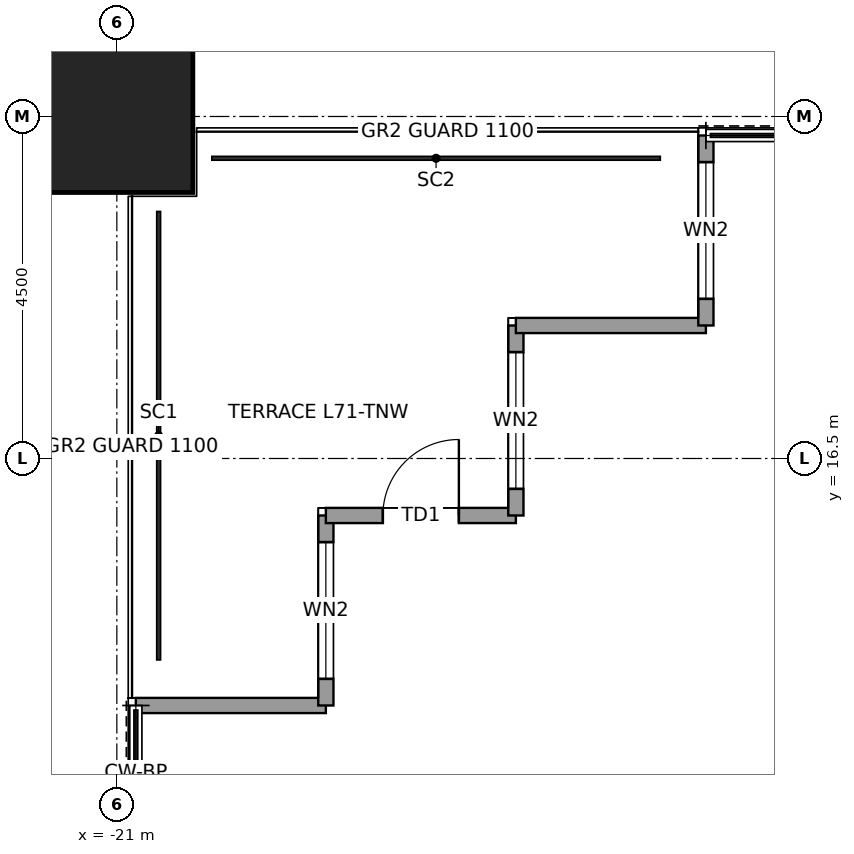
"""IFC4 building model, lengths in metres.
Left out: names, types, materials, properties, quantities, classifications, styles, units other than length and angle.
Written with IfcOpenShell. Run it as: python <this file> out.ifc"""

import sys

from ifc_helpers import new_model, si_unit, direction, frame, frame_2d, origin, origin_2d, place, context, subcontext, project, spatial, rectangle, hollow_rectangle, extrude, element, fill, save


model = new_model("IFC4")
c1 = context("Model", 3, precision=1e-05, world=origin(), true_north=direction((0.0, 1.0)))
c2 = subcontext(c1, "Body", "Model", "MODEL_VIEW")
j1 = project(units=[si_unit("LENGTHUNIT", "METRE"), si_unit("PLANEANGLEUNIT", "RADIAN")], contexts=[c1])
p1 = place(None, origin())
s1 = spatial("IfcSite", under=j1, at=p1, CompositionType="ELEMENT")
p2 = place(p1, origin())
s2 = spatial("IfcBuilding", under=s1, at=p2, CompositionType="ELEMENT")
p3 = place(p2, frame((0.0, 0.0, 319.9)))
s3 = spatial("IfcBuildingStorey", under=s2, at=p3, CompositionType="ELEMENT", Elevation=319.9)
p4 = place(p3, frame((-21.0, 21.0, 0.0), z_axis=(0.0, 0.0, 1.0), x_axis=(1.0, 0.0, 0.0)))
e1 = element("IfcColumn", 1, at=p4, inside=s3, PredefinedType="COLUMN", context=c2, shape_type="SweptSolid", body=[
    extrude(hollow_rectangle(XDim=2.0, YDim=2.0, WallThickness=0.095, at=origin_2d()), origin(), (0.0, 0.0, 1.0), 4.0),
])
p5 = place(p3, frame((-20.75, 13.25, 0.0), z_axis=(0.0, 0.0, 1.0), x_axis=(1.0, 0.0, 0.0)))
e2 = element("IfcWall", 2, at=p5, inside=s3, PredefinedType="SOLIDWALL", context=c2, shape_type="SweptSolid", body=[
    extrude(rectangle(XDim=2.5, YDim=0.2, at=frame_2d((1.25, 0.0))), origin(), (0.0, 0.0, 1.0), 3.85),
])
p6 = place(p3, frame((-18.25, 13.25, 0.0), z_axis=(0.0, 0.0, 1.0), x_axis=(0.0, 1.0, 0.0)))
e3 = element("IfcWall", 3, at=p6, inside=s3, PredefinedType="SOLIDWALL", context=c2, shape_type="SweptSolid", body=[
    extrude(rectangle(XDim=2.5, YDim=0.2, at=frame_2d((1.25, 0.0))), origin(), (0.0, 0.0, 1.0), 3.85),
])
p7 = place(p6, frame((0.35, 0.0, 0.3)))
e4 = element("IfcOpeningElement", 4, at=p7, cuts=e3, PredefinedType="OPENING", context=c2, shape_type="SweptSolid", body=[
    extrude(rectangle(XDim=1.8, YDim=2.4, at=frame_2d((0.9, 1.2))), frame((0.0, 0.11, 0.0), z_axis=(0.0, -1.0, 0.0), x_axis=(1.0, 0.0, 0.0)), (0.0, 0.0, 1.0), 0.22),
])
p8 = place(p3, frame((-18.25, 15.75, 0.0), z_axis=(0.0, 0.0, 1.0), x_axis=(1.0, 0.0, 0.0)))
e5 = element("IfcWall", 5, at=p8, inside=s3, PredefinedType="SOLIDWALL", context=c2, shape_type="SweptSolid", body=[
    extrude(rectangle(XDim=2.5, YDim=0.2, at=frame_2d((1.25, 0.0))), origin(), (0.0, 0.0, 1.0), 3.317),
])
p9 = place(p8, frame((0.75, 0.0, 0.0)))
e6 = element("IfcOpeningElement", 6, at=p9, cuts=e5, PredefinedType="OPENING", context=c2, shape_type="SweptSolid", body=[
    extrude(rectangle(XDim=1.0, YDim=2.4, at=frame_2d((0.5, 1.2))), frame((0.0, 0.11, 0.0), z_axis=(0.0, -1.0, 0.0), x_axis=(1.0, 0.0, 0.0)), (0.0, 0.0, 1.0), 0.22),
])
p10 = place(p3, frame((-15.75, 15.75, 0.0), z_axis=(0.0, 0.0, 1.0), x_axis=(0.0, 1.0, 0.0)))
e7 = element("IfcWall", 7, at=p10, inside=s3, PredefinedType="SOLIDWALL", context=c2, shape_type="SweptSolid", body=[
    extrude(rectangle(XDim=2.5, YDim=0.2, at=frame_2d((1.25, 0.0))), origin(), (0.0, 0.0, 1.0), 3.85),
])
p11 = place(p10, frame((0.35, 0.0, 0.3)))
e8 = element("IfcOpeningElement", 8, at=p11, cuts=e7, PredefinedType="OPENING", context=c2, shape_type="SweptSolid", body=[
    extrude(rectangle(XDim=1.8, YDim=2.4, at=frame_2d((0.9, 1.2))), frame((0.0, 0.11, 0.0), z_axis=(0.0, -1.0, 0.0), x_axis=(1.0, 0.0, 0.0)), (0.0, 0.0, 1.0), 0.22),
])
p12 = place(p3, frame((-15.75, 18.25, 0.0), z_axis=(0.0, 0.0, 1.0), x_axis=(1.0, 0.0, 0.0)))
e9 = element("IfcWall", 9, at=p12, inside=s3, PredefinedType="SOLIDWALL", context=c2, shape_type="SweptSolid", body=[
    extrude(rectangle(XDim=2.5, YDim=0.2, at=frame_2d((1.25, 0.0))), origin(), (0.0, 0.0, 1.0), 3.85),
])
p13 = place(p3, frame((-13.25, 18.25, 0.0), z_axis=(0.0, 0.0, 1.0), x_axis=(0.0, 1.0, 0.0)))
e10 = element("IfcWall", 10, at=p13, inside=s3, PredefinedType="SOLIDWALL", context=c2, shape_type="SweptSolid", body=[
    extrude(rectangle(XDim=2.5, YDim=0.2, at=frame_2d((1.25, 0.0))), origin(), (0.0, 0.0, 1.0), 3.85),
])
p14 = place(p13, frame((0.35, 0.0, 0.3)))
e11 = element("IfcOpeningElement", 11, at=p14, cuts=e10, PredefinedType="OPENING", context=c2, shape_type="SweptSolid", body=[
    extrude(rectangle(XDim=1.8, YDim=2.4, at=frame_2d((0.9, 1.2))), frame((0.0, 0.11, 0.0), z_axis=(0.0, -1.0, 0.0), x_axis=(1.0, 0.0, 0.0)), (0.0, 0.0, 1.0), 0.22),
])
p15 = place(p7, origin())
e12 = element("IfcWindow", 12, at=p15, inside=s3, PartitioningType="SINGLE_PANEL", PredefinedType="WINDOW", context=c2, shape_type="SweptSolid", body=[
    extrude(rectangle(XDim=1.8, YDim=2.4, at=frame_2d((0.9, 1.2))), frame((0.0, 0.03, 0.0), z_axis=(0.0, -1.0, 0.0), x_axis=(1.0, 0.0, 0.0)), (0.0, 0.0, 1.0), 0.06),
])
fill(e4, e12)
p16 = place(p9, origin())
e13 = element("IfcDoor", 13, at=p16, inside=s3, OperationType="SINGLE_SWING_RIGHT", PredefinedType="DOOR", context=c2, shape_type="SweptSolid", body=[
    extrude(rectangle(XDim=1.0, YDim=2.4, at=frame_2d((0.5, 1.2))), frame((0.0, 0.025, 0.0), z_axis=(0.0, -1.0, 0.0), x_axis=(1.0, 0.0, 0.0)), (0.0, 0.0, 1.0), 0.05),
])
fill(e6, e13)
p17 = place(p11, origin())
e14 = element("IfcWindow", 14, at=p17, inside=s3, PartitioningType="SINGLE_PANEL", PredefinedType="WINDOW", context=c2, shape_type="SweptSolid", body=[
    extrude(rectangle(XDim=1.8, YDim=2.4, at=frame_2d((0.9, 1.2))), frame((0.0, 0.03, 0.0), z_axis=(0.0, -1.0, 0.0), x_axis=(1.0, 0.0, 0.0)), (0.0, 0.0, 1.0), 0.06),
])
fill(e8, e14)
p18 = place(p14, origin())
e15 = element("IfcWindow", 15, at=p18, inside=s3, PartitioningType="SINGLE_PANEL", PredefinedType="WINDOW", context=c2, shape_type="SweptSolid", body=[
    extrude(rectangle(XDim=1.8, YDim=2.4, at=frame_2d((0.9, 1.2))), frame((0.0, 0.03, 0.0), z_axis=(0.0, -1.0, 0.0), x_axis=(1.0, 0.0, 0.0)), (0.0, 0.0, 1.0), 0.06),
])
fill(e11, e15)
save(model, sys.argv[1])
